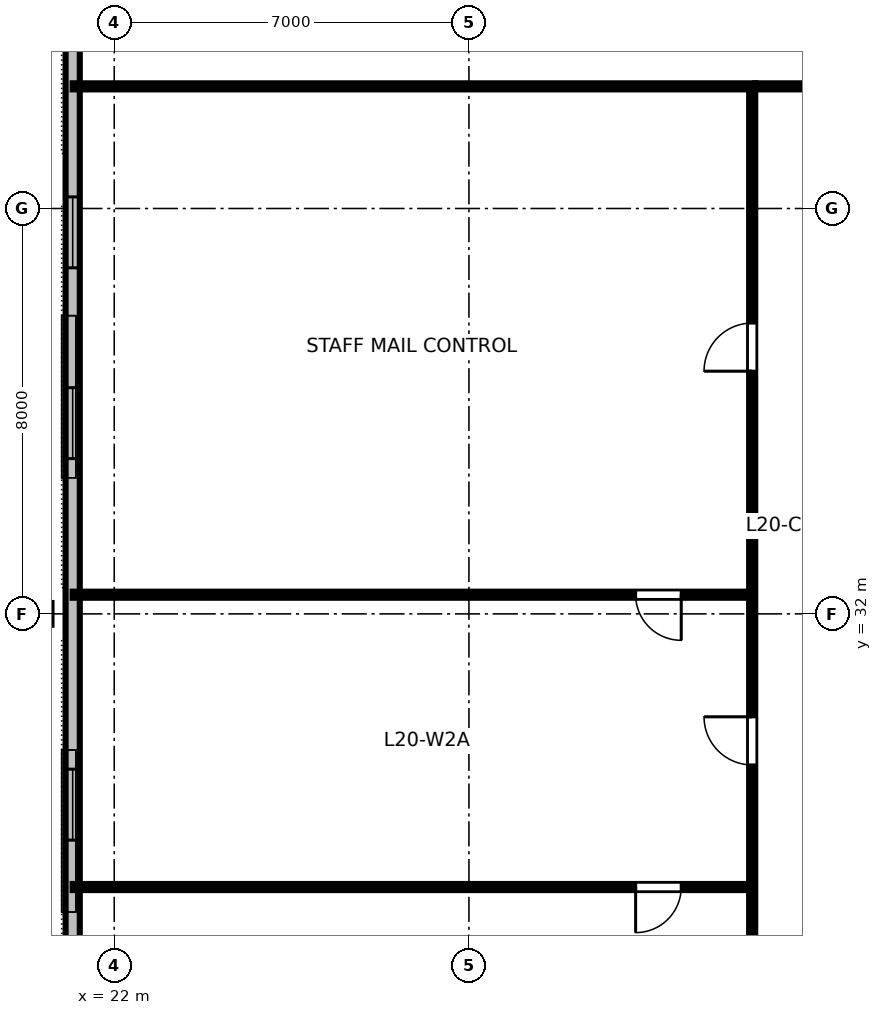
"""IFC4 building model, lengths in metres.
Left out: names, types, materials, properties, quantities, classifications, styles, units other than length and angle.
Written with IfcOpenShell. Run it as: python <this file> out.ifc"""

import sys

from ifc_helpers import new_model, si_unit, direction, frame, frame_2d, origin, origin_2d, place, context, subcontext, project, spatial, rectangle, i_section, extrude, element, fill, save


model = new_model("IFC4")
c1 = context("Model", 3, precision=1e-05, world=origin(), true_north=direction((0.0, 1.0)))
c2 = subcontext(c1, "Body", "Model", "MODEL_VIEW")
j1 = project(units=[si_unit("LENGTHUNIT", "METRE"), si_unit("PLANEANGLEUNIT", "RADIAN")], contexts=[c1])
p1 = place(None, origin())
s1 = spatial("IfcSite", under=j1, at=p1, CompositionType="ELEMENT")
p2 = place(p1, origin())
s2 = spatial("IfcBuilding", under=s1, at=p2, CompositionType="ELEMENT")
p3 = place(p2, frame((0.0, 0.0, 78.4)))
s3 = spatial("IfcBuildingStorey", under=s2, at=p3, CompositionType="ELEMENT", Elevation=78.4)
p4 = place(p3, frame((20.52, 32.0, 0.0), z_axis=(0.190004151907, 0.0, 0.981783286809), x_axis=(-0.981783286809, 0.0, 0.190004151907)))
e1 = element("IfcColumn", 1, at=p4, inside=s3, PredefinedType="COLUMN", context=c2, shape_type="SweptSolid", body=[
    extrude(i_section(OverallWidth=0.428, OverallDepth=0.483, WebThickness=0.051, FlangeThickness=0.082, FilletRadius=0.025, at=origin_2d()), origin(), (0.0, 0.0, 1.0), 3.42),
])
p5 = place(p3, frame((21.18, 50.04, 0.0), z_axis=(0.0, 0.0, 1.0), x_axis=(0.0, -1.0, 0.0)))
e2 = element("IfcWall", 2, at=p5, inside=s3, PredefinedType="STANDARD", context=c2, shape_type="SweptSolid", body=[
    extrude(rectangle(XDim=36.08, YDim=0.28, at=frame_2d((18.04, 0.0))), origin(), (0.0, 0.0, 1.0), 2.662),
])
p6 = place(p5, frame((9.811, 0.0, 0.85)))
e3 = element("IfcOpeningElement", 3, at=p6, cuts=e2, PredefinedType="OPENING", context=c2, shape_type="SweptSolid", body=[
    extrude(rectangle(XDim=1.4, YDim=1.2, at=frame_2d((0.7, 0.6))), frame((0.0, 0.15, 0.0), z_axis=(0.0, -1.0, 0.0), x_axis=(1.0, 0.0, 0.0)), (0.0, 0.0, 1.0), 0.3),
])
p7 = place(p5, frame((13.576, 0.0, 0.85)))
e4 = element("IfcOpeningElement", 4, at=p7, cuts=e2, PredefinedType="OPENING", context=c2, shape_type="SweptSolid", body=[
    extrude(rectangle(XDim=1.4, YDim=1.2, at=frame_2d((0.7, 0.6))), frame((0.0, 0.15, 0.0), z_axis=(0.0, -1.0, 0.0), x_axis=(1.0, 0.0, 0.0)), (0.0, 0.0, 1.0), 0.3),
])
p8 = place(p5, frame((21.104, 0.0, 0.85)))
e5 = element("IfcOpeningElement", 5, at=p8, cuts=e2, PredefinedType="OPENING", context=c2, shape_type="SweptSolid", body=[
    extrude(rectangle(XDim=1.4, YDim=1.2, at=frame_2d((0.7, 0.6))), frame((0.0, 0.15, 0.0), z_axis=(0.0, -1.0, 0.0), x_axis=(1.0, 0.0, 0.0)), (0.0, 0.0, 1.0), 0.3),
])
p9 = place(p5, frame((24.869, 0.0, 0.85)))
e6 = element("IfcOpeningElement", 6, at=p9, cuts=e2, PredefinedType="OPENING", context=c2, shape_type="SweptSolid", body=[
    extrude(rectangle(XDim=1.4, YDim=1.2, at=frame_2d((0.7, 0.6))), frame((0.0, 0.15, 0.0), z_axis=(0.0, -1.0, 0.0), x_axis=(1.0, 0.0, 0.0)), (0.0, 0.0, 1.0), 0.3),
])
p10 = place(p3, frame((34.65, 42.41, 0.0), z_axis=(0.0, 0.0, 1.0), x_axis=(1.0, 0.0, 0.0)))
e7 = element("IfcWall", 7, at=p10, inside=s3, PredefinedType="PARTITIONING", context=c2, shape_type="SweptSolid", body=[
    extrude(rectangle(XDim=22.7, YDim=0.12, at=frame_2d((11.35, 0.0))), origin(), (0.0, 0.0, 1.0), 2.64),
])
p11 = place(p10, frame((4.272, 0.0, 0.0)))
e8 = element("IfcOpeningElement", 8, at=p11, cuts=e7, PredefinedType="OPENING", context=c2, shape_type="SweptSolid", body=[
    extrude(rectangle(XDim=0.95, YDim=2.15, at=frame_2d((0.475, 1.075))), frame((0.0, 0.07, 0.0), z_axis=(0.0, -1.0, 0.0), x_axis=(1.0, 0.0, 0.0)), (0.0, 0.0, 1.0), 0.14),
])
p12 = place(p10, frame((11.432, 0.0, 0.0)))
e9 = element("IfcOpeningElement", 9, at=p12, cuts=e7, PredefinedType="OPENING", context=c2, shape_type="SweptSolid", body=[
    extrude(rectangle(XDim=0.95, YDim=2.15, at=frame_2d((0.475, 1.075))), frame((0.0, 0.07, 0.0), z_axis=(0.0, -1.0, 0.0), x_axis=(1.0, 0.0, 0.0)), (0.0, 0.0, 1.0), 0.14),
])
p13 = place(p10, frame((18.035, 0.0, 0.0)))
e10 = element("IfcOpeningElement", 10, at=p13, cuts=e7, PredefinedType="OPENING", context=c2, shape_type="SweptSolid", body=[
    extrude(rectangle(XDim=0.95, YDim=2.15, at=frame_2d((0.475, 1.075))), frame((0.0, 0.07, 0.0), z_axis=(0.0, -1.0, 0.0), x_axis=(1.0, 0.0, 0.0)), (0.0, 0.0, 1.0), 0.14),
])
p14 = place(p3, frame((34.59, 26.61, 0.0), z_axis=(0.0, 0.0, 1.0), x_axis=(-1.0, 0.0, 0.0)))
e11 = element("IfcWall", 11, at=p14, inside=s3, PredefinedType="PARTITIONING", context=c2, shape_type="SweptSolid", body=[
    extrude(rectangle(XDim=13.41, YDim=0.12, at=frame_2d((6.705, 0.0))), origin(), (0.0, 0.0, 1.0), 2.64),
])
p15 = place(p14, frame((1.4, 0.0, 0.0)))
e12 = element("IfcOpeningElement", 12, at=p15, cuts=e11, PredefinedType="OPENING", context=c2, shape_type="SweptSolid", body=[
    extrude(rectangle(XDim=0.9, YDim=2.15, at=frame_2d((0.45, 1.075))), frame((0.0, 0.07, 0.0), z_axis=(0.0, -1.0, 0.0), x_axis=(1.0, 0.0, 0.0)), (0.0, 0.0, 1.0), 0.14),
])
p16 = place(p3, frame((34.59, 32.378, 0.0), z_axis=(0.0, 0.0, 1.0), x_axis=(-1.0, 0.0, 0.0)))
e13 = element("IfcWall", 13, at=p16, inside=s3, PredefinedType="PARTITIONING", context=c2, shape_type="SweptSolid", body=[
    extrude(rectangle(XDim=13.41, YDim=0.12, at=frame_2d((6.705, 0.0))), origin(), (0.0, 0.0, 1.0), 2.64),
])
p17 = place(p16, frame((1.4, 0.0, 0.0)))
e14 = element("IfcOpeningElement", 14, at=p17, cuts=e13, PredefinedType="OPENING", context=c2, shape_type="SweptSolid", body=[
    extrude(rectangle(XDim=0.9, YDim=2.15, at=frame_2d((0.45, 1.075))), frame((0.0, 0.07, 0.0), z_axis=(0.0, -1.0, 0.0), x_axis=(1.0, 0.0, 0.0)), (0.0, 0.0, 1.0), 0.14),
])
p18 = place(p3, frame((34.59, 21.65, 0.0), z_axis=(0.0, 0.0, 1.0), x_axis=(0.0, 1.0, 0.0)))
e15 = element("IfcWall", 15, at=p18, inside=s3, PredefinedType="PARTITIONING", context=c2, shape_type="SweptSolid", body=[
    extrude(rectangle(XDim=20.7, YDim=0.12, at=frame_2d((10.35, 0.0))), origin(), (0.0, 0.0, 1.0), 2.64),
])
p19 = place(p18, frame((2.105, 0.0, 0.0)))
e16 = element("IfcOpeningElement", 16, at=p19, cuts=e15, PredefinedType="OPENING", context=c2, shape_type="SweptSolid", body=[
    extrude(rectangle(XDim=0.95, YDim=2.15, at=frame_2d((0.475, 1.075))), frame((0.0, 0.07, 0.0), z_axis=(0.0, -1.0, 0.0), x_axis=(1.0, 0.0, 0.0)), (0.0, 0.0, 1.0), 0.14),
])
p20 = place(p18, frame((7.369, 0.0, 0.0)))
e17 = element("IfcOpeningElement", 17, at=p20, cuts=e15, PredefinedType="OPENING", context=c2, shape_type="SweptSolid", body=[
    extrude(rectangle(XDim=0.95, YDim=2.15, at=frame_2d((0.475, 1.075))), frame((0.0, 0.07, 0.0), z_axis=(0.0, -1.0, 0.0), x_axis=(1.0, 0.0, 0.0)), (0.0, 0.0, 1.0), 0.14),
])
p21 = place(p18, frame((15.139, 0.0, 0.0)))
e18 = element("IfcOpeningElement", 18, at=p21, cuts=e15, PredefinedType="OPENING", context=c2, shape_type="SweptSolid", body=[
    extrude(rectangle(XDim=0.95, YDim=2.15, at=frame_2d((0.475, 1.075))), frame((0.0, 0.07, 0.0), z_axis=(0.0, -1.0, 0.0), x_axis=(1.0, 0.0, 0.0)), (0.0, 0.0, 1.0), 0.14),
])
p22 = place(p3, frame((34.65, 42.41, 0.0), z_axis=(0.0, 0.0, 1.0), x_axis=(-1.0, 0.0, 0.0)))
e19 = element("IfcWall", 19, at=p22, inside=s3, PredefinedType="PARTITIONING", context=c2, shape_type="SweptSolid", body=[
    extrude(rectangle(XDim=13.47, YDim=0.12, at=frame_2d((6.735, 0.0))), origin(), (0.0, 0.0, 1.0), 2.64),
])
p23 = place(p6, origin())
e20 = element("IfcWindow", 20, at=p23, inside=s3, PartitioningType="SINGLE_PANEL", PredefinedType="WINDOW", context=c2, shape_type="SweptSolid", body=[
    extrude(rectangle(XDim=1.4, YDim=1.2, at=frame_2d((0.7, 0.6))), frame((0.0, 0.03, 0.0), z_axis=(0.0, -1.0, 0.0), x_axis=(1.0, 0.0, 0.0)), (0.0, 0.0, 1.0), 0.06),
])
fill(e3, e20)
p24 = place(p7, origin())
e21 = element("IfcWindow", 21, at=p24, inside=s3, PartitioningType="SINGLE_PANEL", PredefinedType="WINDOW", context=c2, shape_type="SweptSolid", body=[
    extrude(rectangle(XDim=1.4, YDim=1.2, at=frame_2d((0.7, 0.6))), frame((0.0, 0.03, 0.0), z_axis=(0.0, -1.0, 0.0), x_axis=(1.0, 0.0, 0.0)), (0.0, 0.0, 1.0), 0.06),
])
fill(e4, e21)
p25 = place(p8, origin())
e22 = element("IfcWindow", 22, at=p25, inside=s3, PartitioningType="SINGLE_PANEL", PredefinedType="WINDOW", context=c2, shape_type="SweptSolid", body=[
    extrude(rectangle(XDim=1.4, YDim=1.2, at=frame_2d((0.7, 0.6))), frame((0.0, 0.03, 0.0), z_axis=(0.0, -1.0, 0.0), x_axis=(1.0, 0.0, 0.0)), (0.0, 0.0, 1.0), 0.06),
])
fill(e5, e22)
p26 = place(p15, origin())
e23 = element("IfcDoor", 23, at=p26, inside=s3, OperationType="SINGLE_SWING_RIGHT", PredefinedType="DOOR", context=c2, shape_type="SweptSolid", body=[
    extrude(rectangle(XDim=0.9, YDim=2.15, at=frame_2d((0.45, 1.075))), frame((0.0, 0.025, 0.0), z_axis=(0.0, -1.0, 0.0), x_axis=(1.0, 0.0, 0.0)), (0.0, 0.0, 1.0), 0.05),
])
fill(e12, e23)
p27 = place(p17, origin())
e24 = element("IfcDoor", 24, at=p27, inside=s3, OperationType="SINGLE_SWING_LEFT", PredefinedType="DOOR", context=c2, shape_type="SweptSolid", body=[
    extrude(rectangle(XDim=0.9, YDim=2.15, at=frame_2d((0.45, 1.075))), frame((0.0, 0.025, 0.0), z_axis=(0.0, -1.0, 0.0), x_axis=(1.0, 0.0, 0.0)), (0.0, 0.0, 1.0), 0.05),
])
fill(e14, e24)
p28 = place(p20, origin())
e25 = element("IfcDoor", 25, at=p28, inside=s3, OperationType="SINGLE_SWING_RIGHT", PredefinedType="DOOR", context=c2, shape_type="SweptSolid", body=[
    extrude(rectangle(XDim=0.95, YDim=2.15, at=frame_2d((0.475, 1.075))), frame((0.0, 0.025, 0.0), z_axis=(0.0, -1.0, 0.0), x_axis=(1.0, 0.0, 0.0)), (0.0, 0.0, 1.0), 0.05),
])
fill(e17, e25)
p29 = place(p21, origin())
e26 = element("IfcDoor", 26, at=p29, inside=s3, OperationType="SINGLE_SWING_LEFT", PredefinedType="DOOR", context=c2, shape_type="SweptSolid", body=[
    extrude(rectangle(XDim=0.95, YDim=2.15, at=frame_2d((0.475, 1.075))), frame((0.0, 0.025, 0.0), z_axis=(0.0, -1.0, 0.0), x_axis=(1.0, 0.0, 0.0)), (0.0, 0.0, 1.0), 0.05),
])
fill(e18, e26)
save(model, sys.argv[1])
